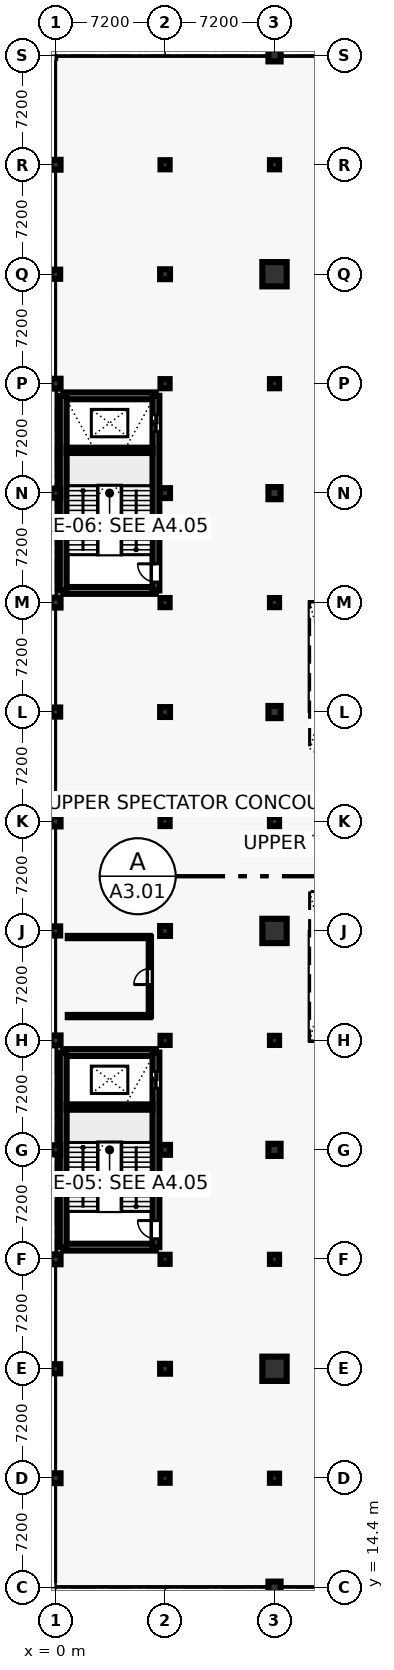
"""IFC4 building model, lengths in metres.
Left out: names, types, materials, properties, quantities, classifications, styles, units other than length and angle.
Written with IfcOpenShell. Run it as: python <this file> out.ifc"""

import sys

from ifc_helpers import new_model, si_unit, direction, frame, frame_2d, origin, origin_2d, place, context, subcontext, project, spatial, rectangle, circle, extrude, element, fill, save


model = new_model("IFC4")
c1 = context("Model", 3, precision=1e-05, world=origin(), true_north=direction((0.0, 1.0)))
c2 = subcontext(c1, "Body", "Model", "MODEL_VIEW")
j1 = project(units=[si_unit("LENGTHUNIT", "METRE"), si_unit("PLANEANGLEUNIT", "RADIAN")], contexts=[c1])
p1 = place(None, origin())
s1 = spatial("IfcSite", under=j1, at=p1, CompositionType="ELEMENT")
p2 = place(p1, origin())
s2 = spatial("IfcBuilding", under=s1, at=p2, CompositionType="ELEMENT")
p3 = place(p2, frame((0.0, 0.0, 13.8)))
s3 = spatial("IfcBuildingStorey", under=s2, at=p3, CompositionType="ELEMENT", Elevation=13.8)
p4 = place(p3, frame((0.0, 21.6, 0.0), z_axis=(0.0, 0.0, 1.0), x_axis=(1.0, 0.0, 0.0)))
e1 = element("IfcColumn", 1, at=p4, inside=s3, PredefinedType="COLUMN", context=c2, shape_type="SweptSolid", body=[
    extrude(rectangle(XDim=0.65, YDim=0.65, at=origin_2d()), origin(), (0.0, 0.0, 1.0), 4.8),
])
p5 = place(p3, frame((0.0, 28.8, 0.0), z_axis=(0.0, 0.0, 1.0), x_axis=(1.0, 0.0, 0.0)))
e2 = element("IfcColumn", 2, at=p5, inside=s3, PredefinedType="COLUMN", context=c2, shape_type="SweptSolid", body=[
    extrude(rectangle(XDim=0.6, YDim=0.6, at=origin_2d()), origin(), (0.0, 0.0, 1.0), 4.8),
])
p6 = place(p3, frame((0.0, 36.0, 0.0), z_axis=(0.0, 0.0, 1.0), x_axis=(1.0, 0.0, 0.0)))
e3 = element("IfcColumn", 3, at=p6, inside=s3, PredefinedType="COLUMN", context=c2, shape_type="SweptSolid", body=[
    extrude(rectangle(XDim=0.65, YDim=0.65, at=origin_2d()), origin(), (0.0, 0.0, 1.0), 4.8),
])
p7 = place(p3, frame((0.0, 43.2, 0.0), z_axis=(0.0, 0.0, 1.0), x_axis=(1.0, 0.0, 0.0)))
e4 = element("IfcColumn", 4, at=p7, inside=s3, PredefinedType="COLUMN", context=c2, shape_type="SweptSolid", body=[
    extrude(rectangle(XDim=0.6, YDim=0.6, at=origin_2d()), origin(), (0.0, 0.0, 1.0), 4.8),
])
p8 = place(p3, frame((0.0, 50.4, 0.0), z_axis=(0.0, 0.0, 1.0), x_axis=(1.0, 0.0, 0.0)))
e5 = element("IfcColumn", 5, at=p8, inside=s3, PredefinedType="COLUMN", context=c2, shape_type="SweptSolid", body=[
    extrude(rectangle(XDim=0.65, YDim=0.65, at=origin_2d()), origin(), (0.0, 0.0, 1.0), 4.8),
])
p9 = place(p3, frame((0.0, 57.6, 0.0), z_axis=(0.0, 0.0, 1.0), x_axis=(1.0, 0.0, 0.0)))
e6 = element("IfcColumn", 6, at=p9, inside=s3, PredefinedType="COLUMN", context=c2, shape_type="SweptSolid", body=[
    extrude(rectangle(XDim=0.6, YDim=0.6, at=origin_2d()), origin(), (0.0, 0.0, 1.0), 4.8),
])
p10 = place(p3, frame((0.0, 64.8, 0.0), z_axis=(0.0, 0.0, 1.0), x_axis=(1.0, 0.0, 0.0)))
e7 = element("IfcColumn", 7, at=p10, inside=s3, PredefinedType="COLUMN", context=c2, shape_type="SweptSolid", body=[
    extrude(rectangle(XDim=0.65, YDim=0.65, at=origin_2d()), origin(), (0.0, 0.0, 1.0), 4.8),
])
p11 = place(p3, frame((0.0, 72.0, 0.0), z_axis=(0.0, 0.0, 1.0), x_axis=(1.0, 0.0, 0.0)))
e8 = element("IfcColumn", 8, at=p11, inside=s3, PredefinedType="COLUMN", context=c2, shape_type="SweptSolid", body=[
    extrude(rectangle(XDim=0.6, YDim=0.6, at=origin_2d()), origin(), (0.0, 0.0, 1.0), 4.8),
])
p12 = place(p3, frame((0.0, 79.2, 0.0), z_axis=(0.0, 0.0, 1.0), x_axis=(1.0, 0.0, 0.0)))
e9 = element("IfcColumn", 9, at=p12, inside=s3, PredefinedType="COLUMN", context=c2, shape_type="SweptSolid", body=[
    extrude(rectangle(XDim=0.65, YDim=0.65, at=origin_2d()), origin(), (0.0, 0.0, 1.0), 4.8),
])
p13 = place(p3, frame((0.0, 86.4, 0.0), z_axis=(0.0, 0.0, 1.0), x_axis=(1.0, 0.0, 0.0)))
e10 = element("IfcColumn", 10, at=p13, inside=s3, PredefinedType="COLUMN", context=c2, shape_type="SweptSolid", body=[
    extrude(rectangle(XDim=0.6, YDim=0.6, at=origin_2d()), origin(), (0.0, 0.0, 1.0), 4.8),
])
p14 = place(p3, frame((0.0, 93.6, 0.0), z_axis=(0.0, 0.0, 1.0), x_axis=(1.0, 0.0, 0.0)))
e11 = element("IfcColumn", 11, at=p14, inside=s3, PredefinedType="COLUMN", context=c2, shape_type="SweptSolid", body=[
    extrude(rectangle(XDim=0.65, YDim=0.65, at=origin_2d()), origin(), (0.0, 0.0, 1.0), 4.8),
])
p15 = place(p3, frame((0.0, 100.8, 0.0), z_axis=(0.0, 0.0, 1.0), x_axis=(1.0, 0.0, 0.0)))
e12 = element("IfcColumn", 12, at=p15, inside=s3, PredefinedType="COLUMN", context=c2, shape_type="SweptSolid", body=[
    extrude(rectangle(XDim=0.6, YDim=0.6, at=origin_2d()), origin(), (0.0, 0.0, 1.0), 4.8),
])
p16 = place(p3, frame((0.0, 108.0, 0.0), z_axis=(0.0, 0.0, 1.0), x_axis=(1.0, 0.0, 0.0)))
e13 = element("IfcColumn", 13, at=p16, inside=s3, PredefinedType="COLUMN", context=c2, shape_type="SweptSolid", body=[
    extrude(rectangle(XDim=0.65, YDim=0.65, at=origin_2d()), origin(), (0.0, 0.0, 1.0), 4.8),
])
p17 = place(p3, frame((7.2, 21.6, 0.0), z_axis=(0.0, 0.0, 1.0), x_axis=(1.0, 0.0, 0.0)))
e14 = element("IfcColumn", 14, at=p17, inside=s3, PredefinedType="COLUMN", context=c2, shape_type="SweptSolid", body=[
    extrude(rectangle(XDim=0.6, YDim=0.6, at=origin_2d()), origin(), (0.0, 0.0, 1.0), 4.8),
])
p18 = place(p3, frame((7.2, 28.8, 0.0), z_axis=(0.0, 0.0, 1.0), x_axis=(1.0, 0.0, 0.0)))
e15 = element("IfcColumn", 15, at=p18, inside=s3, PredefinedType="COLUMN", context=c2, shape_type="SweptSolid", body=[
    extrude(rectangle(XDim=0.65, YDim=0.65, at=origin_2d()), origin(), (0.0, 0.0, 1.0), 4.8),
])
p19 = place(p3, frame((7.2, 36.0, 0.0), z_axis=(0.0, 0.0, 1.0), x_axis=(1.0, 0.0, 0.0)))
e16 = element("IfcColumn", 16, at=p19, inside=s3, PredefinedType="COLUMN", context=c2, shape_type="SweptSolid", body=[
    extrude(rectangle(XDim=0.6, YDim=0.6, at=origin_2d()), origin(), (0.0, 0.0, 1.0), 4.8),
])
p20 = place(p3, frame((7.2, 43.2, 0.0), z_axis=(0.0, 0.0, 1.0), x_axis=(1.0, 0.0, 0.0)))
e17 = element("IfcColumn", 17, at=p20, inside=s3, PredefinedType="COLUMN", context=c2, shape_type="SweptSolid", body=[
    extrude(rectangle(XDim=0.65, YDim=0.65, at=origin_2d()), origin(), (0.0, 0.0, 1.0), 4.8),
])
p21 = place(p3, frame((7.2, 50.4, 0.0), z_axis=(0.0, 0.0, 1.0), x_axis=(1.0, 0.0, 0.0)))
e18 = element("IfcColumn", 18, at=p21, inside=s3, PredefinedType="COLUMN", context=c2, shape_type="SweptSolid", body=[
    extrude(rectangle(XDim=0.6, YDim=0.6, at=origin_2d()), origin(), (0.0, 0.0, 1.0), 4.8),
])
p22 = place(p3, frame((7.2, 57.6, 0.0), z_axis=(0.0, 0.0, 1.0), x_axis=(1.0, 0.0, 0.0)))
e19 = element("IfcColumn", 19, at=p22, inside=s3, PredefinedType="COLUMN", context=c2, shape_type="SweptSolid", body=[
    extrude(rectangle(XDim=0.65, YDim=0.65, at=origin_2d()), origin(), (0.0, 0.0, 1.0), 4.8),
])
p23 = place(p3, frame((7.2, 64.8, 0.0), z_axis=(0.0, 0.0, 1.0), x_axis=(1.0, 0.0, 0.0)))
e20 = element("IfcColumn", 20, at=p23, inside=s3, PredefinedType="COLUMN", context=c2, shape_type="SweptSolid", body=[
    extrude(rectangle(XDim=0.6, YDim=0.6, at=origin_2d()), origin(), (0.0, 0.0, 1.0), 4.8),
])
p24 = place(p3, frame((7.2, 72.0, 0.0), z_axis=(0.0, 0.0, 1.0), x_axis=(1.0, 0.0, 0.0)))
e21 = element("IfcColumn", 21, at=p24, inside=s3, PredefinedType="COLUMN", context=c2, shape_type="SweptSolid", body=[
    extrude(rectangle(XDim=0.65, YDim=0.65, at=origin_2d()), origin(), (0.0, 0.0, 1.0), 4.8),
])
p25 = place(p3, frame((7.2, 79.2, 0.0), z_axis=(0.0, 0.0, 1.0), x_axis=(1.0, 0.0, 0.0)))
e22 = element("IfcColumn", 22, at=p25, inside=s3, PredefinedType="COLUMN", context=c2, shape_type="SweptSolid", body=[
    extrude(rectangle(XDim=0.6, YDim=0.6, at=origin_2d()), origin(), (0.0, 0.0, 1.0), 4.8),
])
p26 = place(p3, frame((7.2, 86.4, 0.0), z_axis=(0.0, 0.0, 1.0), x_axis=(1.0, 0.0, 0.0)))
e23 = element("IfcColumn", 23, at=p26, inside=s3, PredefinedType="COLUMN", context=c2, shape_type="SweptSolid", body=[
    extrude(rectangle(XDim=0.65, YDim=0.65, at=origin_2d()), origin(), (0.0, 0.0, 1.0), 4.8),
])
p27 = place(p3, frame((7.2, 93.6, 0.0), z_axis=(0.0, 0.0, 1.0), x_axis=(1.0, 0.0, 0.0)))
e24 = element("IfcColumn", 24, at=p27, inside=s3, PredefinedType="COLUMN", context=c2, shape_type="SweptSolid", body=[
    extrude(rectangle(XDim=0.6, YDim=0.6, at=origin_2d()), origin(), (0.0, 0.0, 1.0), 4.8),
])
p28 = place(p3, frame((7.2, 100.8, 0.0), z_axis=(0.0, 0.0, 1.0), x_axis=(1.0, 0.0, 0.0)))
e25 = element("IfcColumn", 25, at=p28, inside=s3, PredefinedType="COLUMN", context=c2, shape_type="SweptSolid", body=[
    extrude(rectangle(XDim=0.65, YDim=0.65, at=origin_2d()), origin(), (0.0, 0.0, 1.0), 4.8),
])
p29 = place(p3, frame((7.2, 108.0, 0.0), z_axis=(0.0, 0.0, 1.0), x_axis=(1.0, 0.0, 0.0)))
e26 = element("IfcColumn", 26, at=p29, inside=s3, PredefinedType="COLUMN", context=c2, shape_type="SweptSolid", body=[
    extrude(rectangle(XDim=0.6, YDim=0.6, at=origin_2d()), origin(), (0.0, 0.0, 1.0), 4.8),
])
p30 = place(p3, frame((14.4, 14.4, 0.0), z_axis=(0.0, 0.0, 1.0), x_axis=(1.0, 0.0, 0.0)))
e27 = element("IfcColumn", 27, at=p30, inside=s3, PredefinedType="COLUMN", context=c2, shape_type="SweptSolid", body=[
    extrude(circle(Radius=0.4, at=origin_2d()), origin(), (0.0, 0.0, 1.0), 4.8),
])
p31 = place(p3, frame((14.4, 21.6, 0.0), z_axis=(0.0, 0.0, 1.0), x_axis=(1.0, 0.0, 0.0)))
e28 = element("IfcColumn", 28, at=p31, inside=s3, PredefinedType="COLUMN", context=c2, shape_type="SweptSolid", body=[
    extrude(rectangle(XDim=0.6, YDim=0.6, at=origin_2d()), origin(), (0.0, 0.0, 1.0), 4.8),
])
p32 = place(p3, frame((14.4, 28.8, 0.0), z_axis=(0.0, 0.0, 1.0), x_axis=(1.0, 0.0, 0.0)))
e29 = element("IfcColumn", 29, at=p32, inside=s3, PredefinedType="COLUMN", context=c2, shape_type="SweptSolid", body=[
    extrude(circle(Radius=0.8, at=origin_2d()), origin(), (0.0, 0.0, 1.0), 4.8),
])
p33 = place(p3, frame((14.4, 36.0, 0.0), z_axis=(0.0, 0.0, 1.0), x_axis=(1.0, 0.0, 0.0)))
e30 = element("IfcColumn", 30, at=p33, inside=s3, PredefinedType="COLUMN", context=c2, shape_type="SweptSolid", body=[
    extrude(rectangle(XDim=0.6, YDim=0.6, at=origin_2d()), origin(), (0.0, 0.0, 1.0), 4.8),
])
p34 = place(p3, frame((14.4, 43.2, 0.0), z_axis=(0.0, 0.0, 1.0), x_axis=(1.0, 0.0, 0.0)))
e31 = element("IfcColumn", 31, at=p34, inside=s3, PredefinedType="COLUMN", context=c2, shape_type="SweptSolid", body=[
    extrude(circle(Radius=0.4, at=origin_2d()), origin(), (0.0, 0.0, 1.0), 4.8),
])
p35 = place(p3, frame((14.4, 50.4, 0.0), z_axis=(0.0, 0.0, 1.0), x_axis=(1.0, 0.0, 0.0)))
e32 = element("IfcColumn", 32, at=p35, inside=s3, PredefinedType="COLUMN", context=c2, shape_type="SweptSolid", body=[
    extrude(rectangle(XDim=0.6, YDim=0.6, at=origin_2d()), origin(), (0.0, 0.0, 1.0), 4.8),
])
p36 = place(p3, frame((14.4, 57.6, 0.0), z_axis=(0.0, 0.0, 1.0), x_axis=(1.0, 0.0, 0.0)))
e33 = element("IfcColumn", 33, at=p36, inside=s3, PredefinedType="COLUMN", context=c2, shape_type="SweptSolid", body=[
    extrude(circle(Radius=0.8, at=origin_2d()), origin(), (0.0, 0.0, 1.0), 4.8),
])
p37 = place(p3, frame((14.4, 64.8, 0.0), z_axis=(0.0, 0.0, 1.0), x_axis=(1.0, 0.0, 0.0)))
e34 = element("IfcColumn", 34, at=p37, inside=s3, PredefinedType="COLUMN", context=c2, shape_type="SweptSolid", body=[
    extrude(rectangle(XDim=0.6, YDim=0.6, at=origin_2d()), origin(), (0.0, 0.0, 1.0), 4.8),
])
p38 = place(p3, frame((14.4, 72.0, 0.0), z_axis=(0.0, 0.0, 1.0), x_axis=(1.0, 0.0, 0.0)))
e35 = element("IfcColumn", 35, at=p38, inside=s3, PredefinedType="COLUMN", context=c2, shape_type="SweptSolid", body=[
    extrude(circle(Radius=0.4, at=origin_2d()), origin(), (0.0, 0.0, 1.0), 4.8),
])
p39 = place(p3, frame((14.4, 79.2, 0.0), z_axis=(0.0, 0.0, 1.0), x_axis=(1.0, 0.0, 0.0)))
e36 = element("IfcColumn", 36, at=p39, inside=s3, PredefinedType="COLUMN", context=c2, shape_type="SweptSolid", body=[
    extrude(rectangle(XDim=0.6, YDim=0.6, at=origin_2d()), origin(), (0.0, 0.0, 1.0), 4.8),
])
p40 = place(p3, frame((14.4, 86.4, 0.0), z_axis=(0.0, 0.0, 1.0), x_axis=(1.0, 0.0, 0.0)))
e37 = element("IfcColumn", 37, at=p40, inside=s3, PredefinedType="COLUMN", context=c2, shape_type="SweptSolid", body=[
    extrude(circle(Radius=0.4, at=origin_2d()), origin(), (0.0, 0.0, 1.0), 4.8),
])
p41 = place(p3, frame((14.4, 93.6, 0.0), z_axis=(0.0, 0.0, 1.0), x_axis=(1.0, 0.0, 0.0)))
e38 = element("IfcColumn", 38, at=p41, inside=s3, PredefinedType="COLUMN", context=c2, shape_type="SweptSolid", body=[
    extrude(rectangle(XDim=0.6, YDim=0.6, at=origin_2d()), origin(), (0.0, 0.0, 1.0), 4.8),
])
p42 = place(p3, frame((14.4, 100.8, 0.0), z_axis=(0.0, 0.0, 1.0), x_axis=(1.0, 0.0, 0.0)))
e39 = element("IfcColumn", 39, at=p42, inside=s3, PredefinedType="COLUMN", context=c2, shape_type="SweptSolid", body=[
    extrude(circle(Radius=0.8, at=origin_2d()), origin(), (0.0, 0.0, 1.0), 4.8),
])
p43 = place(p3, frame((14.4, 108.0, 0.0), z_axis=(0.0, 0.0, 1.0), x_axis=(1.0, 0.0, 0.0)))
e40 = element("IfcColumn", 40, at=p43, inside=s3, PredefinedType="COLUMN", context=c2, shape_type="SweptSolid", body=[
    extrude(rectangle(XDim=0.6, YDim=0.6, at=origin_2d()), origin(), (0.0, 0.0, 1.0), 4.8),
])
p44 = place(p3, frame((14.4, 115.2, 0.0), z_axis=(0.0, 0.0, 1.0), x_axis=(1.0, 0.0, 0.0)))
e41 = element("IfcColumn", 41, at=p44, inside=s3, PredefinedType="COLUMN", context=c2, shape_type="SweptSolid", body=[
    extrude(circle(Radius=0.4, at=origin_2d()), origin(), (0.0, 0.0, 1.0), 4.8),
])
for number, where, z_axis, x_axis in (
    (42, (0.5, 36.8, 0.0), (0.0, 0.0, 1.0), (1.0, 0.0, 0.0)),
    (43, (0.5, 49.6, 0.0), (0.0, 0.0, 1.0), (1.0, 0.0, 0.0)),
):
    element("IfcWall", number, at=place(p3, frame(where, z_axis=z_axis, x_axis=x_axis)), inside=s3, PredefinedType="SHEAR", context=c2, shape_type="SweptSolid", body=[
        extrude(rectangle(XDim=6.1, YDim=0.45, at=frame_2d((3.05, 0.0))), origin(), (0.0, 0.0, 1.0), 4.53),
    ])
p45 = place(p3, frame((0.5, 36.8, 0.0), z_axis=(0.0, 0.0, 1.0), x_axis=(0.0, 1.0, 0.0)))
e44 = element("IfcWall", 44, at=p45, inside=s3, PredefinedType="SHEAR", context=c2, shape_type="SweptSolid", body=[
    extrude(rectangle(XDim=12.8, YDim=0.45, at=frame_2d((6.4, 0.0))), origin(), (0.0, 0.0, 1.0), 4.53),
])
p46 = place(p3, frame((6.6, 36.8, 0.0), z_axis=(0.0, 0.0, 1.0), x_axis=(0.0, 1.0, 0.0)))
e45 = element("IfcWall", 45, at=p46, inside=s3, PredefinedType="SHEAR", context=c2, shape_type="SweptSolid", body=[
    extrude(rectangle(XDim=12.8, YDim=0.45, at=frame_2d((6.4, 0.0))), origin(), (0.0, 0.0, 1.0), 4.53),
])
p47 = place(p46, frame((0.55, 0.0, 0.0)))
e46 = element("IfcOpeningElement", 46, at=p47, cuts=e45, PredefinedType="OPENING", context=c2, shape_type="SweptSolid", body=[
    extrude(rectangle(XDim=1.2, YDim=2.25, at=frame_2d((0.6, 1.125))), frame((0.0, 0.235, 0.0), z_axis=(0.0, -1.0, 0.0), x_axis=(1.0, 0.0, 0.0)), (0.0, 0.0, 1.0), 0.47),
])
p48 = place(p46, frame((10.458, 0.0, 0.0)))
e47 = element("IfcOpeningElement", 47, at=p48, cuts=e45, PredefinedType="OPENING", context=c2, shape_type="SweptSolid", body=[
    extrude(rectangle(XDim=1.1, YDim=2.2, at=frame_2d((0.55, 1.1))), frame((0.0, 0.235, 0.0), z_axis=(0.0, -1.0, 0.0), x_axis=(1.0, 0.0, 0.0)), (0.0, 0.0, 1.0), 0.47),
])
p49 = place(p3, frame((0.725, 46.016, 0.0), z_axis=(0.0, 0.0, 1.0), x_axis=(1.0, 0.0, 0.0)))
e48 = element("IfcWall", 48, at=p49, inside=s3, PredefinedType="SHEAR", context=c2, shape_type="SweptSolid", body=[
    extrude(rectangle(XDim=5.65, YDim=0.35, at=frame_2d((2.825, 0.0))), origin(), (0.0, 0.0, 1.0), 4.53),
])
for number, where, z_axis, x_axis in (
    (49, (0.5, 80.0, 0.0), (0.0, 0.0, 1.0), (1.0, 0.0, 0.0)),
    (50, (0.5, 92.8, 0.0), (0.0, 0.0, 1.0), (1.0, 0.0, 0.0)),
):
    element("IfcWall", number, at=place(p3, frame(where, z_axis=z_axis, x_axis=x_axis)), inside=s3, PredefinedType="SHEAR", context=c2, shape_type="SweptSolid", body=[
        extrude(rectangle(XDim=6.1, YDim=0.45, at=frame_2d((3.05, 0.0))), origin(), (0.0, 0.0, 1.0), 4.53),
    ])
p50 = place(p3, frame((0.5, 80.0, 0.0), z_axis=(0.0, 0.0, 1.0), x_axis=(0.0, 1.0, 0.0)))
e51 = element("IfcWall", 51, at=p50, inside=s3, PredefinedType="SHEAR", context=c2, shape_type="SweptSolid", body=[
    extrude(rectangle(XDim=12.8, YDim=0.45, at=frame_2d((6.4, 0.0))), origin(), (0.0, 0.0, 1.0), 4.53),
])
p51 = place(p3, frame((6.6, 80.0, 0.0), z_axis=(0.0, 0.0, 1.0), x_axis=(0.0, 1.0, 0.0)))
e52 = element("IfcWall", 52, at=p51, inside=s3, PredefinedType="SHEAR", context=c2, shape_type="SweptSolid", body=[
    extrude(rectangle(XDim=12.8, YDim=0.45, at=frame_2d((6.4, 0.0))), origin(), (0.0, 0.0, 1.0), 4.53),
])
p52 = place(p51, frame((0.55, 0.0, 0.0)))
e53 = element("IfcOpeningElement", 53, at=p52, cuts=e52, PredefinedType="OPENING", context=c2, shape_type="SweptSolid", body=[
    extrude(rectangle(XDim=1.2, YDim=2.25, at=frame_2d((0.6, 1.125))), frame((0.0, 0.235, 0.0), z_axis=(0.0, -1.0, 0.0), x_axis=(1.0, 0.0, 0.0)), (0.0, 0.0, 1.0), 0.47),
])
p53 = place(p51, frame((10.458, 0.0, 0.0)))
e54 = element("IfcOpeningElement", 54, at=p53, cuts=e52, PredefinedType="OPENING", context=c2, shape_type="SweptSolid", body=[
    extrude(rectangle(XDim=1.1, YDim=2.2, at=frame_2d((0.55, 1.1))), frame((0.0, 0.235, 0.0), z_axis=(0.0, -1.0, 0.0), x_axis=(1.0, 0.0, 0.0)), (0.0, 0.0, 1.0), 0.47),
])
p54 = place(p3, frame((0.725, 89.216, 0.0), z_axis=(0.0, 0.0, 1.0), x_axis=(1.0, 0.0, 0.0)))
e55 = element("IfcWall", 55, at=p54, inside=s3, PredefinedType="SHEAR", context=c2, shape_type="SweptSolid", body=[
    extrude(rectangle(XDim=5.65, YDim=0.35, at=frame_2d((2.825, 0.0))), origin(), (0.0, 0.0, 1.0), 4.53),
])
p55 = place(p3, frame((0.8, 52.0, 0.0), z_axis=(0.0, 0.0, 1.0), x_axis=(1.0, 0.0, 0.0)))
e56 = element("IfcWall", 56, at=p55, inside=s3, PredefinedType="PARTITIONING", context=c2, shape_type="SweptSolid", body=[
    extrude(rectangle(XDim=5.4, YDim=0.15, at=frame_2d((2.7, 0.0))), origin(), (0.0, 0.0, 1.0), 3.59),
])
p56 = place(p3, frame((6.2, 52.0, 0.0), z_axis=(0.0, 0.0, 1.0), x_axis=(0.0, 1.0, 0.0)))
e57 = element("IfcWall", 57, at=p56, inside=s3, PredefinedType="PARTITIONING", context=c2, shape_type="SweptSolid", body=[
    extrude(rectangle(XDim=5.2, YDim=0.15, at=frame_2d((2.6, 0.0))), origin(), (0.0, 0.0, 1.0), 3.59),
])
p57 = place(p56, frame((2.075, 0.0, 0.0)))
e58 = element("IfcOpeningElement", 58, at=p57, cuts=e57, PredefinedType="OPENING", context=c2, shape_type="SweptSolid", body=[
    extrude(rectangle(XDim=1.05, YDim=2.2, at=frame_2d((0.525, 1.1))), frame((0.0, 0.085, 0.0), z_axis=(0.0, -1.0, 0.0), x_axis=(1.0, 0.0, 0.0)), (0.0, 0.0, 1.0), 0.17),
])
p58 = place(p3, frame((6.2, 57.2, 0.0), z_axis=(0.0, 0.0, 1.0), x_axis=(-1.0, 0.0, 0.0)))
e59 = element("IfcWall", 59, at=p58, inside=s3, PredefinedType="PARTITIONING", context=c2, shape_type="SweptSolid", body=[
    extrude(rectangle(XDim=5.4, YDim=0.15, at=frame_2d((2.7, 0.0))), origin(), (0.0, 0.0, 1.0), 3.59),
])
p59 = place(p47, origin())
e60 = element("IfcDoor", 60, at=p59, inside=s3, OperationType="SINGLE_SWING_RIGHT", PredefinedType="DOOR", context=c2, shape_type="SweptSolid", body=[
    extrude(rectangle(XDim=1.2, YDim=2.25, at=frame_2d((0.6, 1.125))), frame((0.0, 0.025, 0.0), z_axis=(0.0, -1.0, 0.0), x_axis=(1.0, 0.0, 0.0)), (0.0, 0.0, 1.0), 0.05),
])
fill(e46, e60)
p60 = place(p48, origin())
e61 = element("IfcDoor", 61, at=p60, inside=s3, OperationType="SLIDING_TO_LEFT", PredefinedType="DOOR", context=c2, shape_type="SweptSolid", body=[
    extrude(rectangle(XDim=1.1, YDim=2.2, at=frame_2d((0.55, 1.1))), frame((0.0, 0.025, 0.0), z_axis=(0.0, -1.0, 0.0), x_axis=(1.0, 0.0, 0.0)), (0.0, 0.0, 1.0), 0.05),
])
fill(e47, e61)
p61 = place(p52, origin())
e62 = element("IfcDoor", 62, at=p61, inside=s3, OperationType="SINGLE_SWING_RIGHT", PredefinedType="DOOR", context=c2, shape_type="SweptSolid", body=[
    extrude(rectangle(XDim=1.2, YDim=2.25, at=frame_2d((0.6, 1.125))), frame((0.0, 0.025, 0.0), z_axis=(0.0, -1.0, 0.0), x_axis=(1.0, 0.0, 0.0)), (0.0, 0.0, 1.0), 0.05),
])
fill(e53, e62)
p62 = place(p53, origin())
e63 = element("IfcDoor", 63, at=p62, inside=s3, OperationType="SLIDING_TO_LEFT", PredefinedType="DOOR", context=c2, shape_type="SweptSolid", body=[
    extrude(rectangle(XDim=1.1, YDim=2.2, at=frame_2d((0.55, 1.1))), frame((0.0, 0.025, 0.0), z_axis=(0.0, -1.0, 0.0), x_axis=(1.0, 0.0, 0.0)), (0.0, 0.0, 1.0), 0.05),
])
fill(e54, e63)
p63 = place(p57, origin())
e64 = element("IfcDoor", 64, at=p63, inside=s3, OperationType="SINGLE_SWING_LEFT", PredefinedType="DOOR", context=c2, shape_type="SweptSolid", body=[
    extrude(rectangle(XDim=1.05, YDim=2.2, at=frame_2d((0.525, 1.1))), frame((0.0, 0.025, 0.0), z_axis=(0.0, -1.0, 0.0), x_axis=(1.0, 0.0, 0.0)), (0.0, 0.0, 1.0), 0.05),
])
fill(e58, e64)
save(model, sys.argv[1])
